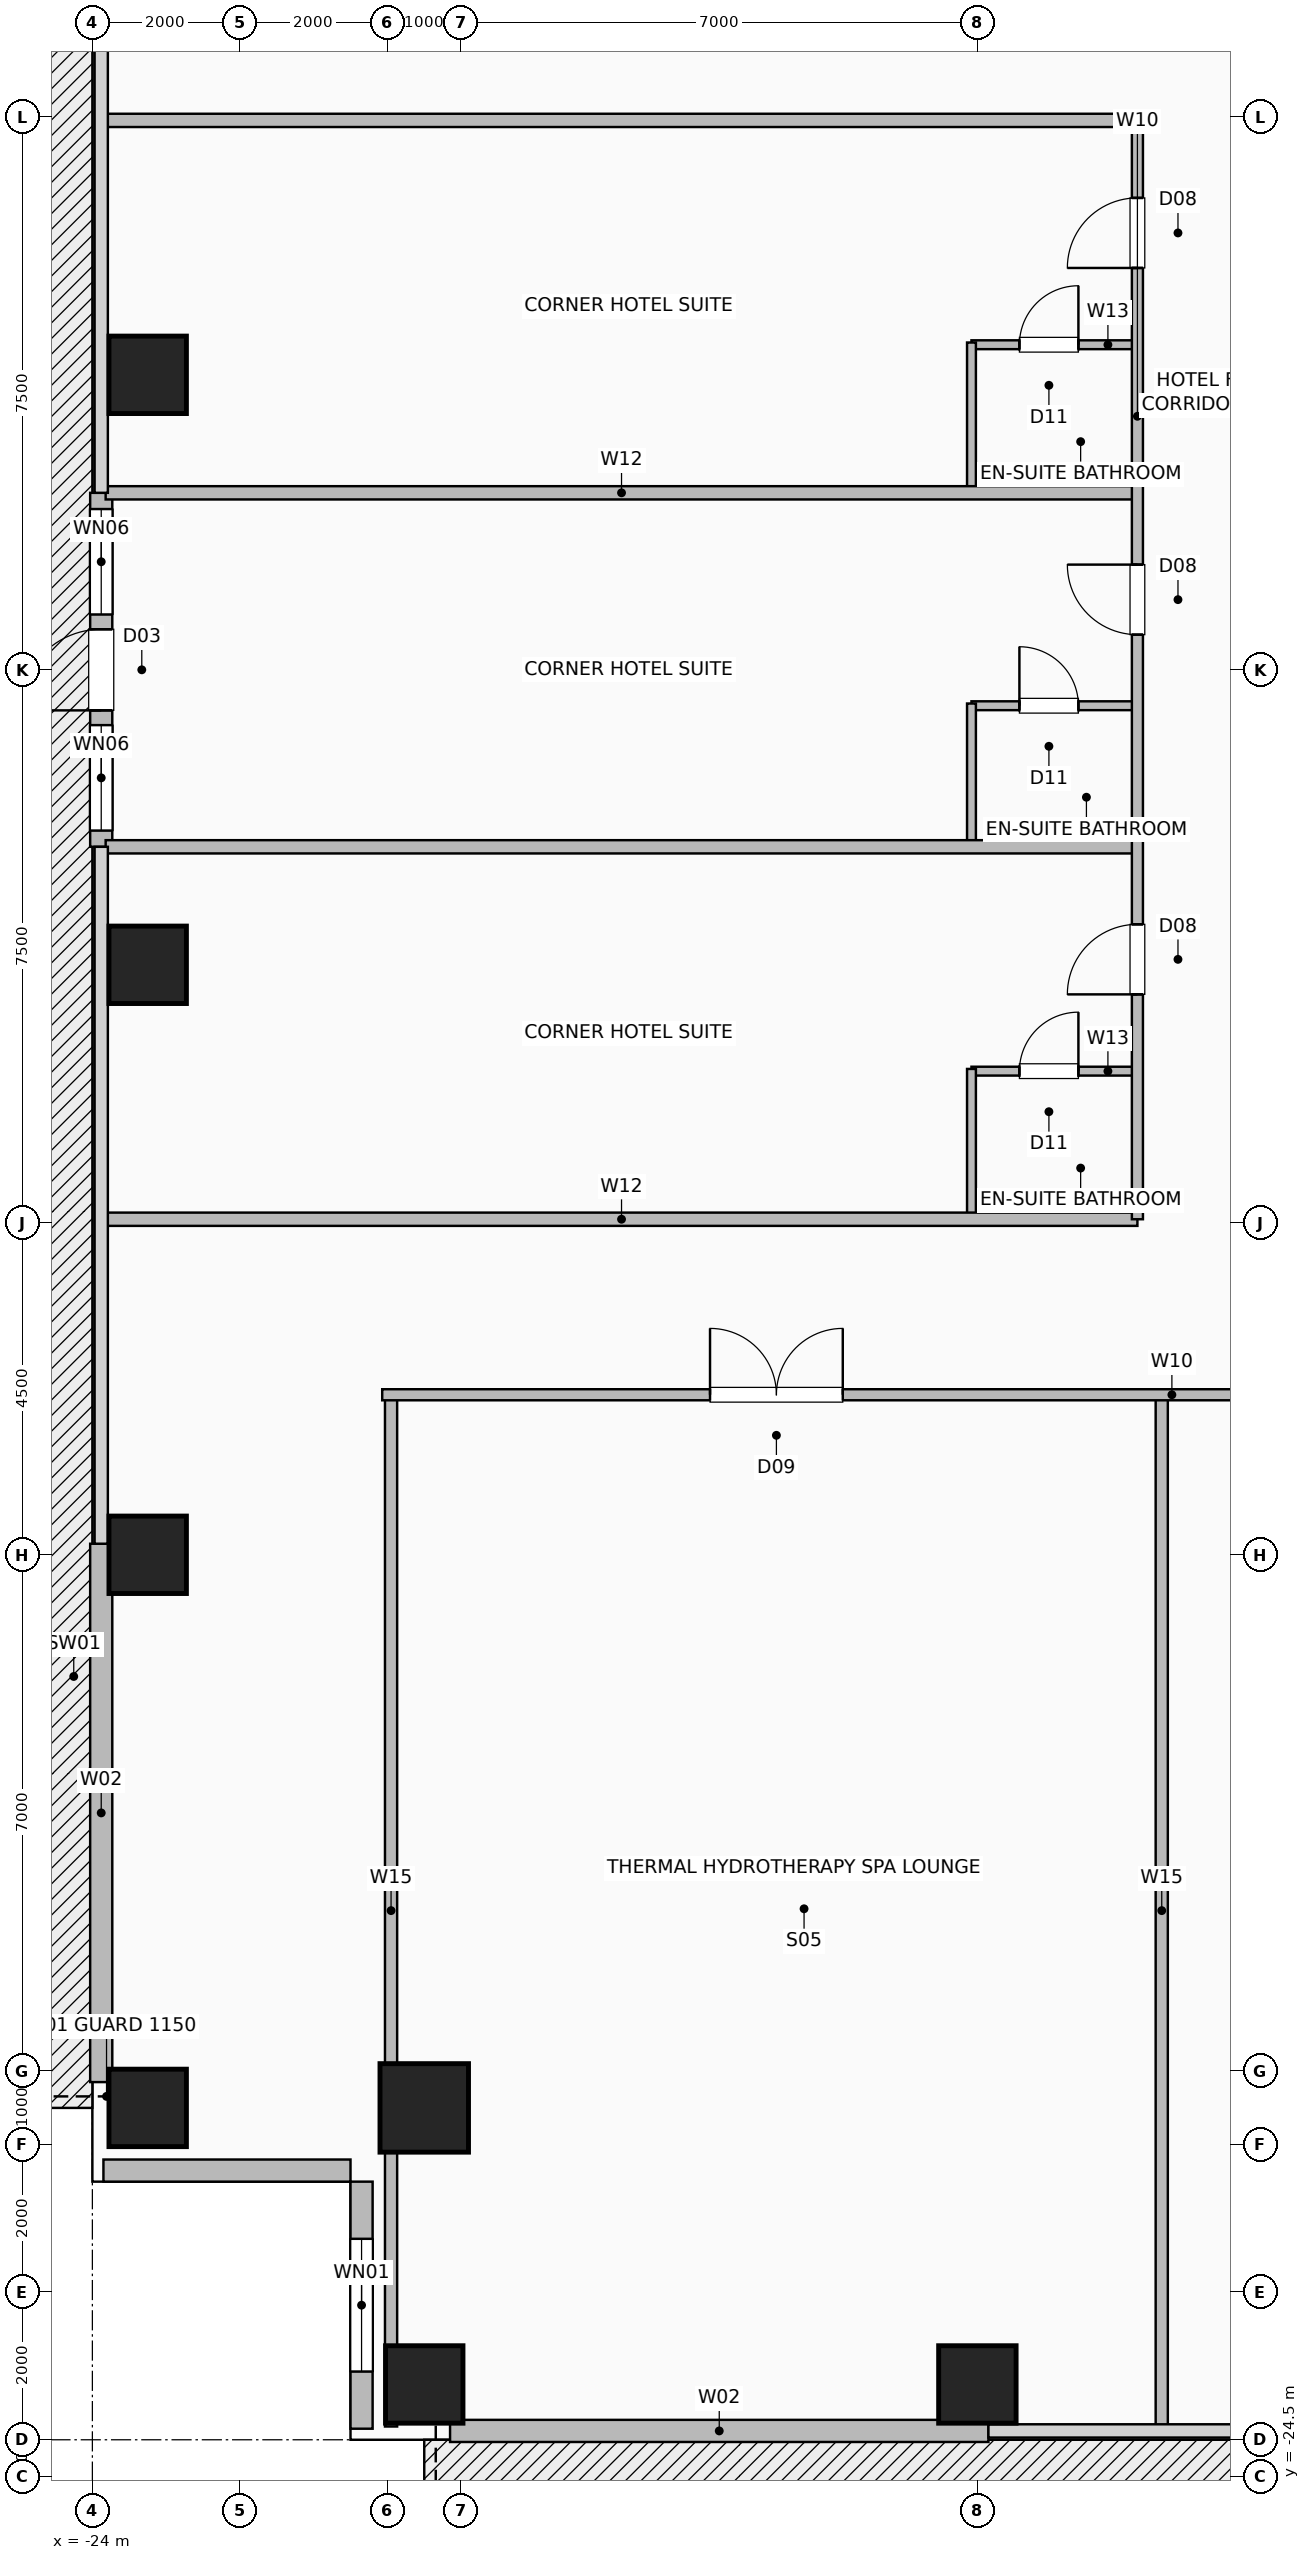
"""IFC4 building model, lengths in metres.
Left out: names, types, materials, properties, quantities, classifications, styles, units other than length and angle.
Written with IfcOpenShell. Run it as: python <this file> out.ifc"""

import sys

from ifc_helpers import new_model, si_unit, direction, frame, frame_2d, origin, origin_2d, place, context, subcontext, project, spatial, rectangle, hollow_rectangle, extrude, element, fill, save


model = new_model("IFC4")
c1 = context("Model", 3, precision=1e-05, world=origin(), true_north=direction((0.0, 1.0)))
c2 = subcontext(c1, "Body", "Model", "MODEL_VIEW")
j1 = project(units=[si_unit("LENGTHUNIT", "METRE"), si_unit("PLANEANGLEUNIT", "RADIAN")], contexts=[c1])
p1 = place(None, origin())
s1 = spatial("IfcSite", under=j1, at=p1, CompositionType="ELEMENT")
p2 = place(p1, origin())
s2 = spatial("IfcBuilding", under=s1, at=p2, CompositionType="ELEMENT")
p3 = place(p2, frame((0.0, 0.0, 55.0)))
s3 = spatial("IfcBuildingStorey", under=s2, at=p3, CompositionType="ELEMENT", Elevation=55.0)
for number, where, z_axis, x_axis in (
    (1, (-19.5, -23.25, 0.0), (0.0, 0.0, 1.0), (1.0, 0.0, 0.0)),
    (2, (-23.25, -19.5, 0.0), (0.0, 0.0, 1.0), (1.0, 0.0, 0.0)),
    (3, (-12.0, -23.25, 0.0), (0.0, 0.0, 1.0), (1.0, 0.0, 0.0)),
    (4, (-23.25, -12.0, 0.0), (0.0, 0.0, 1.0), (1.0, 0.0, 0.0)),
    (5, (-23.25, -4.0, 0.0), (0.0, 0.0, 1.0), (1.0, 0.0, 0.0)),
    (6, (-23.25, 4.0, 0.0), (0.0, 0.0, 1.0), (1.0, 0.0, 0.0)),
):
    element("IfcColumn", number, at=place(p3, frame(where, z_axis=z_axis, x_axis=x_axis)), inside=s3, PredefinedType="COLUMN", context=c2, shape_type="SweptSolid", body=[
        extrude(hollow_rectangle(XDim=1.05, YDim=1.05, WallThickness=0.05, at=origin_2d()), origin(), (0.0, 0.0, 1.0), 3.5),
    ])
p4 = place(p3, frame((-19.5, -19.5, 0.0), z_axis=(0.0, 0.0, 1.0), x_axis=(1.0, 0.0, 0.0)))
e7 = element("IfcColumn", 7, at=p4, inside=s3, PredefinedType="COLUMN", context=c2, shape_type="SweptSolid", body=[
    extrude(hollow_rectangle(XDim=1.2, YDim=1.2, WallThickness=0.055, at=origin_2d()), origin(), (0.0, 0.0, 1.0), 3.5),
])
for number, where, z_axis, x_axis in (
    (8, (-19.15, -23.88, 0.0), (0.0, 0.0, 1.0), (1.0, 0.0, 0.0)),
    (9, (-23.88, -19.15, 0.0), (0.0, 0.0, 1.0), (0.0, 1.0, 0.0)),
):
    element("IfcWall", number, at=place(p3, frame(where, z_axis=z_axis, x_axis=x_axis)), inside=s3, PredefinedType="SOLIDWALL", context=c2, shape_type="SweptSolid", body=[
        extrude(rectangle(XDim=7.3, YDim=0.3, at=frame_2d((3.65, 0.0))), origin(), (0.0, 0.0, 1.0), 3.25),
    ])
p5 = place(p3, frame((-23.88, -2.4, 0.0), z_axis=(0.0, 0.0, 1.0), x_axis=(0.0, 1.0, 0.0)))
e10 = element("IfcWall", 10, at=p5, inside=s3, PredefinedType="SOLIDWALL", context=c2, shape_type="SweptSolid", body=[
    extrude(rectangle(XDim=4.8, YDim=0.3, at=frame_2d((2.4, 0.0))), origin(), (0.0, 0.0, 1.0), 3.25),
])
p6 = place(p5, frame((1.85, 0.0, 0.0)))
e11 = element("IfcOpeningElement", 11, at=p6, cuts=e10, PredefinedType="OPENING", context=c2, shape_type="SweptSolid", body=[
    extrude(rectangle(XDim=1.1, YDim=2.2, at=frame_2d((0.55, 1.1))), frame((0.0, 0.16, 0.0), z_axis=(0.0, -1.0, 0.0), x_axis=(1.0, 0.0, 0.0)), (0.0, 0.0, 1.0), 0.32),
])
p7 = place(p5, frame((0.22, 0.0, 0.85)))
e12 = element("IfcOpeningElement", 12, at=p7, cuts=e10, PredefinedType="OPENING", context=c2, shape_type="SweptSolid", body=[
    extrude(rectangle(XDim=1.43, YDim=1.8, at=frame_2d((0.715, 0.9))), frame((0.0, 0.16, 0.0), z_axis=(0.0, -1.0, 0.0), x_axis=(1.0, 0.0, 0.0)), (0.0, 0.0, 1.0), 0.32),
])
p8 = place(p5, frame((3.15, 0.0, 0.85)))
e13 = element("IfcOpeningElement", 13, at=p8, cuts=e10, PredefinedType="OPENING", context=c2, shape_type="SweptSolid", body=[
    extrude(rectangle(XDim=1.43, YDim=1.8, at=frame_2d((0.715, 0.9))), frame((0.0, 0.16, 0.0), z_axis=(0.0, -1.0, 0.0), x_axis=(1.0, 0.0, 0.0)), (0.0, 0.0, 1.0), 0.32),
])
p9 = place(p3, frame((-20.35, -23.85, 0.0), z_axis=(0.0, 0.0, 1.0), x_axis=(0.0, 1.0, 0.0)))
e14 = element("IfcWall", 14, at=p9, inside=s3, PredefinedType="SOLIDWALL", context=c2, shape_type="SweptSolid", body=[
    extrude(rectangle(XDim=3.35, YDim=0.3, at=frame_2d((1.675, 0.0))), origin(), (0.0, 0.0, 1.0), 3.25),
])
p10 = place(p9, frame((0.775, 0.0, 0.9)))
e15 = element("IfcOpeningElement", 15, at=p10, cuts=e14, PredefinedType="OPENING", context=c2, shape_type="SweptSolid", body=[
    extrude(rectangle(XDim=1.8, YDim=1.8, at=frame_2d((0.9, 0.9))), frame((0.0, 0.16, 0.0), z_axis=(0.0, -1.0, 0.0), x_axis=(1.0, 0.0, 0.0)), (0.0, 0.0, 1.0), 0.32),
])
p11 = place(p3, frame((-23.85, -20.35, 0.0), z_axis=(0.0, 0.0, 1.0), x_axis=(1.0, 0.0, 0.0)))
e16 = element("IfcWall", 16, at=p11, inside=s3, PredefinedType="SOLIDWALL", context=c2, shape_type="SweptSolid", body=[
    extrude(rectangle(XDim=3.35, YDim=0.3, at=frame_2d((1.675, 0.0))), origin(), (0.0, 0.0, 1.0), 3.25),
])
for number, where, z_axis, x_axis in (
    (17, (-19.95, -23.82, 0.0), (0.0, 0.0, 1.0), (0.0, 1.0, 0.0)),
    (18, (-9.5, -23.82, 0.0), (0.0, 0.0, 1.0), (0.0, 1.0, 0.0)),
):
    element("IfcWall", number, at=place(p3, frame(where, z_axis=z_axis, x_axis=x_axis)), inside=s3, PredefinedType="PLUMBINGWALL", context=c2, shape_type="SweptSolid", body=[
        extrude(rectangle(XDim=13.99, YDim=0.165, at=frame_2d((6.995, 0.0))), origin(), (0.0, 0.0, 1.0), 3.25),
    ])
p12 = place(p3, frame((-20.07, -9.83, 0.0), z_axis=(0.0, 0.0, 1.0), x_axis=(1.0, 0.0, 0.0)))
e19 = element("IfcWall", 19, at=p12, inside=s3, PredefinedType="PARTITIONING", context=c2, shape_type="SweptSolid", body=[
    extrude(rectangle(XDim=40.14, YDim=0.15, at=frame_2d((20.07, 0.0))), origin(), (0.0, 0.0, 1.0), 3.25),
])
p13 = place(p12, frame((4.445, 0.0, 0.0)))
e20 = element("IfcOpeningElement", 20, at=p13, cuts=e19, PredefinedType="OPENING", context=c2, shape_type="SweptSolid", body=[
    extrude(rectangle(XDim=1.8, YDim=2.08, at=frame_2d((0.9, 1.04))), frame((0.0, 0.085, 0.0), z_axis=(0.0, -1.0, 0.0), x_axis=(1.0, 0.0, 0.0)), (0.0, 0.0, 1.0), 0.17),
])
p14 = place(p12, frame((15.17, 0.0, 0.0)))
e21 = element("IfcOpeningElement", 21, at=p14, cuts=e19, PredefinedType="OPENING", context=c2, shape_type="SweptSolid", body=[
    extrude(rectangle(XDim=1.8, YDim=2.08, at=frame_2d((0.9, 1.04))), frame((0.0, 0.085, 0.0), z_axis=(0.0, -1.0, 0.0), x_axis=(1.0, 0.0, 0.0)), (0.0, 0.0, 1.0), 0.17),
])
p15 = place(p12, frame((21.98, 0.0, 0.0)))
e22 = element("IfcOpeningElement", 22, at=p15, cuts=e19, PredefinedType="OPENING", context=c2, shape_type="SweptSolid", body=[
    extrude(rectangle(XDim=0.85, YDim=2.05, at=frame_2d((0.425, 1.025))), frame((0.0, 0.085, 0.0), z_axis=(0.0, -1.0, 0.0), x_axis=(1.0, 0.0, 0.0)), (0.0, 0.0, 1.0), 0.17),
])
p16 = place(p12, frame((23.78, 0.0, 0.0)))
e23 = element("IfcOpeningElement", 23, at=p16, cuts=e19, PredefinedType="OPENING", context=c2, shape_type="SweptSolid", body=[
    extrude(rectangle(XDim=0.95, YDim=2.06, at=frame_2d((0.475, 1.03))), frame((0.0, 0.085, 0.0), z_axis=(0.0, -1.0, 0.0), x_axis=(1.0, 0.0, 0.0)), (0.0, 0.0, 1.0), 0.17),
])
p17 = place(p12, frame((25.845, 0.0, 0.0)))
e24 = element("IfcOpeningElement", 24, at=p17, cuts=e19, PredefinedType="OPENING", context=c2, shape_type="SweptSolid", body=[
    extrude(rectangle(XDim=0.85, YDim=2.05, at=frame_2d((0.425, 1.025))), frame((0.0, 0.085, 0.0), z_axis=(0.0, -1.0, 0.0), x_axis=(1.0, 0.0, 0.0)), (0.0, 0.0, 1.0), 0.17),
])
p18 = place(p12, frame((32.745, 0.0, 0.0)))
e25 = element("IfcOpeningElement", 25, at=p18, cuts=e19, PredefinedType="OPENING", context=c2, shape_type="SweptSolid", body=[
    extrude(rectangle(XDim=1.8, YDim=2.08, at=frame_2d((0.9, 1.04))), frame((0.0, 0.085, 0.0), z_axis=(0.0, -1.0, 0.0), x_axis=(1.0, 0.0, 0.0)), (0.0, 0.0, 1.0), 0.17),
])
p19 = place(p3, frame((-12.08, -5.442, 0.0), z_axis=(0.0, 0.0, 1.0), x_axis=(1.0, 0.0, 0.0)))
e26 = element("IfcWall", 26, at=p19, inside=s3, PredefinedType="PLUMBINGWALL", context=c2, shape_type="SweptSolid", body=[
    extrude(rectangle(XDim=2.25, YDim=0.12, at=frame_2d((1.125, 0.0))), origin(), (0.0, 0.0, 1.0), 3.25),
])
p20 = place(p19, frame((0.65, 0.0, 0.0)))
e27 = element("IfcOpeningElement", 27, at=p20, cuts=e26, PredefinedType="OPENING", context=c2, shape_type="SweptSolid", body=[
    extrude(rectangle(XDim=0.8, YDim=2.05, at=frame_2d((0.4, 1.025))), frame((0.0, 0.07, 0.0), z_axis=(0.0, -1.0, 0.0), x_axis=(1.0, 0.0, 0.0)), (0.0, 0.0, 1.0), 0.14),
])
p21 = place(p3, frame((-12.08, -7.42, 0.0), z_axis=(0.0, 0.0, 1.0), x_axis=(0.0, 1.0, 0.0)))
e28 = element("IfcWall", 28, at=p21, inside=s3, PredefinedType="PLUMBINGWALL", context=c2, shape_type="SweptSolid", body=[
    extrude(rectangle(XDim=2.008, YDim=0.12, at=frame_2d((1.004, 0.0))), origin(), (0.0, 0.0, 1.0), 3.25),
])
p22 = place(p3, frame((-12.08, -0.487, 0.0), z_axis=(0.0, 0.0, 1.0), x_axis=(1.0, 0.0, 0.0)))
e29 = element("IfcWall", 29, at=p22, inside=s3, PredefinedType="PLUMBINGWALL", context=c2, shape_type="SweptSolid", body=[
    extrude(rectangle(XDim=2.25, YDim=0.12, at=frame_2d((1.125, 0.0))), origin(), (0.0, 0.0, 1.0), 3.25),
])
p23 = place(p22, frame((0.65, 0.0, 0.0)))
e30 = element("IfcOpeningElement", 30, at=p23, cuts=e29, PredefinedType="OPENING", context=c2, shape_type="SweptSolid", body=[
    extrude(rectangle(XDim=0.8, YDim=2.05, at=frame_2d((0.4, 1.025))), frame((0.0, 0.07, 0.0), z_axis=(0.0, -1.0, 0.0), x_axis=(1.0, 0.0, 0.0)), (0.0, 0.0, 1.0), 0.14),
])
p24 = place(p3, frame((-12.08, -2.37, 0.0), z_axis=(0.0, 0.0, 1.0), x_axis=(0.0, 1.0, 0.0)))
e31 = element("IfcWall", 31, at=p24, inside=s3, PredefinedType="PLUMBINGWALL", context=c2, shape_type="SweptSolid", body=[
    extrude(rectangle(XDim=1.913, YDim=0.12, at=frame_2d((0.957, 0.0))), origin(), (0.0, 0.0, 1.0), 3.25),
])
p25 = place(p3, frame((-12.08, 4.408, 0.0), z_axis=(0.0, 0.0, 1.0), x_axis=(1.0, 0.0, 0.0)))
e32 = element("IfcWall", 32, at=p25, inside=s3, PredefinedType="PLUMBINGWALL", context=c2, shape_type="SweptSolid", body=[
    extrude(rectangle(XDim=2.25, YDim=0.12, at=frame_2d((1.125, 0.0))), origin(), (0.0, 0.0, 1.0), 3.25),
])
p26 = place(p25, frame((0.65, 0.0, 0.0)))
e33 = element("IfcOpeningElement", 33, at=p26, cuts=e32, PredefinedType="OPENING", context=c2, shape_type="SweptSolid", body=[
    extrude(rectangle(XDim=0.8, YDim=2.05, at=frame_2d((0.4, 1.025))), frame((0.0, 0.07, 0.0), z_axis=(0.0, -1.0, 0.0), x_axis=(1.0, 0.0, 0.0)), (0.0, 0.0, 1.0), 0.14),
])
p27 = place(p3, frame((-12.08, 2.43, 0.0), z_axis=(0.0, 0.0, 1.0), x_axis=(0.0, 1.0, 0.0)))
e34 = element("IfcWall", 34, at=p27, inside=s3, PredefinedType="PLUMBINGWALL", context=c2, shape_type="SweptSolid", body=[
    extrude(rectangle(XDim=2.008, YDim=0.12, at=frame_2d((1.004, 0.0))), origin(), (0.0, 0.0, 1.0), 3.25),
])
for number, where, z_axis, x_axis in (
    (35, (-23.82, -7.45, 0.0), (0.0, 0.0, 1.0), (1.0, 0.0, 0.0)),
    (36, (-23.82, -2.4, 0.0), (0.0, 0.0, 1.0), (1.0, 0.0, 0.0)),
    (37, (-23.82, 2.4, 0.0), (0.0, 0.0, 1.0), (1.0, 0.0, 0.0)),
    (38, (-23.82, 7.45, 0.0), (0.0, 0.0, 1.0), (1.0, 0.0, 0.0)),
):
    element("IfcWall", number, at=place(p3, frame(where, z_axis=z_axis, x_axis=x_axis)), inside=s3, PredefinedType="PARTITIONING", context=c2, shape_type="SweptSolid", body=[
        extrude(rectangle(XDim=13.99, YDim=0.18, at=frame_2d((6.995, 0.0))), origin(), (0.0, 0.0, 1.0), 3.25),
    ])
p28 = place(p3, frame((-9.83, -7.45, 0.0), z_axis=(0.0, 0.0, 1.0), x_axis=(0.0, 1.0, 0.0)))
e39 = element("IfcWall", 39, at=p28, inside=s3, PredefinedType="PARTITIONING", context=c2, shape_type="SweptSolid", body=[
    extrude(rectangle(XDim=14.9, YDim=0.15, at=frame_2d((7.45, 0.0))), origin(), (0.0, 0.0, 1.0), 3.25),
])
p29 = place(p28, frame((3.049, 0.0, 0.0)))
e40 = element("IfcOpeningElement", 40, at=p29, cuts=e39, PredefinedType="OPENING", context=c2, shape_type="SweptSolid", body=[
    extrude(rectangle(XDim=0.95, YDim=2.08, at=frame_2d((0.475, 1.04))), frame((0.0, 0.085, 0.0), z_axis=(0.0, -1.0, 0.0), x_axis=(1.0, 0.0, 0.0)), (0.0, 0.0, 1.0), 0.17),
])
p30 = place(p28, frame((7.927, 0.0, 0.0)))
e41 = element("IfcOpeningElement", 41, at=p30, cuts=e39, PredefinedType="OPENING", context=c2, shape_type="SweptSolid", body=[
    extrude(rectangle(XDim=0.95, YDim=2.08, at=frame_2d((0.475, 1.04))), frame((0.0, 0.085, 0.0), z_axis=(0.0, -1.0, 0.0), x_axis=(1.0, 0.0, 0.0)), (0.0, 0.0, 1.0), 0.17),
])
p31 = place(p28, frame((12.899, 0.0, 0.0)))
e42 = element("IfcOpeningElement", 42, at=p31, cuts=e39, PredefinedType="OPENING", context=c2, shape_type="SweptSolid", body=[
    extrude(rectangle(XDim=0.95, YDim=2.08, at=frame_2d((0.475, 1.04))), frame((0.0, 0.085, 0.0), z_axis=(0.0, -1.0, 0.0), x_axis=(1.0, 0.0, 0.0)), (0.0, 0.0, 1.0), 0.17),
])
p32 = place(p6, origin())
e43 = element("IfcDoor", 43, at=p32, inside=s3, OperationType="SINGLE_SWING_LEFT", PredefinedType="DOOR", context=c2, shape_type="SweptSolid", body=[
    extrude(rectangle(XDim=1.1, YDim=2.2, at=frame_2d((0.55, 1.1))), frame((0.0, 0.025, 0.0), z_axis=(0.0, -1.0, 0.0), x_axis=(1.0, 0.0, 0.0)), (0.0, 0.0, 1.0), 0.05),
])
fill(e11, e43)
p33 = place(p7, origin())
e44 = element("IfcWindow", 44, at=p33, inside=s3, PartitioningType="SINGLE_PANEL", PredefinedType="WINDOW", context=c2, shape_type="SweptSolid", body=[
    extrude(rectangle(XDim=1.43, YDim=1.8, at=frame_2d((0.715, 0.9))), frame((0.0, 0.03, 0.0), z_axis=(0.0, -1.0, 0.0), x_axis=(1.0, 0.0, 0.0)), (0.0, 0.0, 1.0), 0.06),
])
fill(e12, e44)
p34 = place(p8, origin())
e45 = element("IfcWindow", 45, at=p34, inside=s3, PartitioningType="SINGLE_PANEL", PredefinedType="WINDOW", context=c2, shape_type="SweptSolid", body=[
    extrude(rectangle(XDim=1.43, YDim=1.8, at=frame_2d((0.715, 0.9))), frame((0.0, 0.03, 0.0), z_axis=(0.0, -1.0, 0.0), x_axis=(1.0, 0.0, 0.0)), (0.0, 0.0, 1.0), 0.06),
])
fill(e13, e45)
p35 = place(p10, origin())
e46 = element("IfcWindow", 46, at=p35, inside=s3, PartitioningType="SINGLE_PANEL", PredefinedType="WINDOW", context=c2, shape_type="SweptSolid", body=[
    extrude(rectangle(XDim=1.8, YDim=1.8, at=frame_2d((0.9, 0.9))), frame((0.0, 0.03, 0.0), z_axis=(0.0, -1.0, 0.0), x_axis=(1.0, 0.0, 0.0)), (0.0, 0.0, 1.0), 0.06),
])
fill(e15, e46)
p36 = place(p13, origin())
e47 = element("IfcDoor", 47, at=p36, inside=s3, OperationType="DOUBLE_DOOR_SINGLE_SWING", PredefinedType="DOOR", context=c2, shape_type="SweptSolid", body=[
    extrude(rectangle(XDim=1.8, YDim=2.08, at=frame_2d((0.9, 1.04))), frame((0.0, 0.025, 0.0), z_axis=(0.0, -1.0, 0.0), x_axis=(1.0, 0.0, 0.0)), (0.0, 0.0, 1.0), 0.05),
])
fill(e20, e47)
p37 = place(p20, origin())
e48 = element("IfcDoor", 48, at=p37, inside=s3, OperationType="SINGLE_SWING_RIGHT", PredefinedType="DOOR", context=c2, shape_type="SweptSolid", body=[
    extrude(rectangle(XDim=0.8, YDim=2.05, at=frame_2d((0.4, 1.025))), frame((0.0, 0.025, 0.0), z_axis=(0.0, -1.0, 0.0), x_axis=(1.0, 0.0, 0.0)), (0.0, 0.0, 1.0), 0.05),
])
fill(e27, e48)
p38 = place(p23, origin())
e49 = element("IfcDoor", 49, at=p38, inside=s3, OperationType="SINGLE_SWING_LEFT", PredefinedType="DOOR", context=c2, shape_type="SweptSolid", body=[
    extrude(rectangle(XDim=0.8, YDim=2.05, at=frame_2d((0.4, 1.025))), frame((0.0, 0.025, 0.0), z_axis=(0.0, -1.0, 0.0), x_axis=(1.0, 0.0, 0.0)), (0.0, 0.0, 1.0), 0.05),
])
fill(e30, e49)
p39 = place(p26, origin())
e50 = element("IfcDoor", 50, at=p39, inside=s3, OperationType="SINGLE_SWING_RIGHT", PredefinedType="DOOR", context=c2, shape_type="SweptSolid", body=[
    extrude(rectangle(XDim=0.8, YDim=2.05, at=frame_2d((0.4, 1.025))), frame((0.0, 0.025, 0.0), z_axis=(0.0, -1.0, 0.0), x_axis=(1.0, 0.0, 0.0)), (0.0, 0.0, 1.0), 0.05),
])
fill(e33, e50)
p40 = place(p29, origin())
e51 = element("IfcDoor", 51, at=p40, inside=s3, OperationType="SINGLE_SWING_LEFT", PredefinedType="DOOR", context=c2, shape_type="SweptSolid", body=[
    extrude(rectangle(XDim=0.95, YDim=2.08, at=frame_2d((0.475, 1.04))), frame((0.0, 0.025, 0.0), z_axis=(0.0, -1.0, 0.0), x_axis=(1.0, 0.0, 0.0)), (0.0, 0.0, 1.0), 0.05),
])
fill(e40, e51)
p41 = place(p30, origin())
e52 = element("IfcDoor", 52, at=p41, inside=s3, OperationType="SINGLE_SWING_RIGHT", PredefinedType="DOOR", context=c2, shape_type="SweptSolid", body=[
    extrude(rectangle(XDim=0.95, YDim=2.08, at=frame_2d((0.475, 1.04))), frame((0.0, 0.025, 0.0), z_axis=(0.0, -1.0, 0.0), x_axis=(1.0, 0.0, 0.0)), (0.0, 0.0, 1.0), 0.05),
])
fill(e41, e52)
p42 = place(p31, origin())
e53 = element("IfcDoor", 53, at=p42, inside=s3, OperationType="SINGLE_SWING_LEFT", PredefinedType="DOOR", context=c2, shape_type="SweptSolid", body=[
    extrude(rectangle(XDim=0.95, YDim=2.08, at=frame_2d((0.475, 1.04))), frame((0.0, 0.025, 0.0), z_axis=(0.0, -1.0, 0.0), x_axis=(1.0, 0.0, 0.0)), (0.0, 0.0, 1.0), 0.05),
])
fill(e42, e53)
save(model, sys.argv[1])
